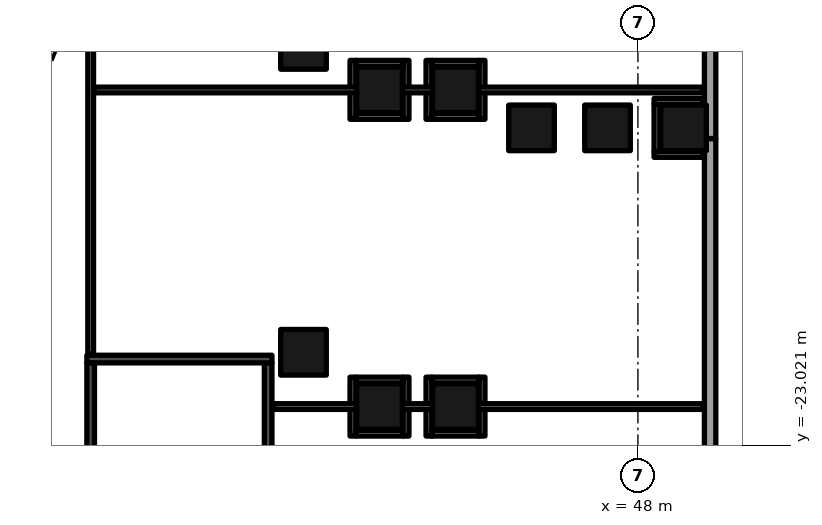
"""IFC4 building model, lengths in metres.
Left out: names, types, materials, properties, quantities, classifications, styles, units other than length and angle.
Written with IfcOpenShell. Run it as: python <this file> out.ifc"""

import sys

from ifc_helpers import new_model, si_unit, direction, frame, frame_2d, origin, origin_2d, place, context, subcontext, project, spatial, rectangle, extrude, element, fill, save


model = new_model("IFC4")
c1 = context("Model", 3, precision=1e-05, world=origin(), true_north=direction((0.0, 1.0)))
c2 = subcontext(c1, "Body", "Model", "MODEL_VIEW")
j1 = project(units=[si_unit("LENGTHUNIT", "METRE"), si_unit("PLANEANGLEUNIT", "RADIAN")], contexts=[c1])
p1 = place(None, origin())
s1 = spatial("IfcSite", under=j1, at=p1, CompositionType="ELEMENT")
p2 = place(p1, origin())
s2 = spatial("IfcBuilding", under=s1, at=p2, CompositionType="ELEMENT")
p3 = place(p2, origin())
s3 = spatial("IfcBuildingStorey", under=s2, at=p3, CompositionType="ELEMENT", Elevation=0.0)
for number, where, z_axis, x_axis in (
    (1, (39.2, -12.524, 0.0), (0.0, 0.0, 1.0), (1.0, 0.0, 0.0)),
    (2, (39.2, -20.572, 0.0), (0.0, 0.0, 1.0), (1.0, 0.0, 0.0)),
    (3, (41.2, -13.667, 0.0), (0.0, 0.0, 1.0), (1.0, 0.0, 0.0)),
    (4, (41.2, -22.001, 0.0), (0.0, 0.0, 1.0), (1.0, 0.0, 0.0)),
    (5, (43.2, -13.667, 0.0), (0.0, 0.0, 1.0), (1.0, 0.0, 0.0)),
    (6, (43.2, -22.001, 0.0), (0.0, 0.0, 1.0), (1.0, 0.0, 0.0)),
    (7, (45.2, -14.667, 0.0), (0.0, 0.0, 1.0), (1.0, 0.0, 0.0)),
    (8, (47.2, -14.667, 0.0), (0.0, 0.0, 1.0), (1.0, 0.0, 0.0)),
    (9, (49.2, -14.667, 0.0), (0.0, 0.0, 1.0), (1.0, 0.0, 0.0)),
):
    element("IfcColumn", number, at=place(p3, frame(where, z_axis=z_axis, x_axis=x_axis)), inside=s3, PredefinedType="COLUMN", context=c2, shape_type="SweptSolid", body=[
        extrude(rectangle(XDim=1.2, YDim=1.2, at=origin_2d()), origin(), (0.0, 0.0, 1.0), 9.0),
    ])
p4 = place(p3, frame((49.9, -23.498, 0.0), z_axis=(0.0, 0.0, 1.0), x_axis=(0.0, 1.0, 0.0)))
e10 = element("IfcWall", 10, at=p4, inside=s3, PredefinedType="ELEMENTEDWALL", context=c2, shape_type="SweptSolid", body=[
    extrude(rectangle(XDim=8.55, YDim=0.3, at=frame_2d((4.275, 0.0))), origin(), (0.0, 0.0, 1.0), 7.6),
])
p5 = place(p4, frame((2.002, 0.0, 0.0)))
e11 = element("IfcOpeningElement", 11, at=p5, cuts=e10, PredefinedType="OPENING", context=c2, shape_type="SweptSolid", body=[
    extrude(rectangle(XDim=3.0, YDim=2.7, at=frame_2d((1.5, 1.35))), frame((0.0, 0.16, 0.0), z_axis=(0.0, -1.0, 0.0), x_axis=(1.0, 0.0, 0.0)), (0.0, 0.0, 1.0), 0.32),
])
p6 = place(p3, frame((49.9, -14.948, 0.0), z_axis=(0.0, 0.0, 1.0), x_axis=(0.0, 1.0, 0.0)))
e12 = element("IfcWall", 12, at=p6, inside=s3, PredefinedType="ELEMENTEDWALL", context=c2, shape_type="SweptSolid", body=[
    extrude(rectangle(XDim=6.7, YDim=0.3, at=frame_2d((3.35, 0.0))), origin(), (0.0, 0.0, 1.0), 7.6),
])
p7 = place(p6, frame((3.548, 0.0, 0.0)))
e13 = element("IfcOpeningElement", 13, at=p7, cuts=e12, PredefinedType="OPENING", context=c2, shape_type="SweptSolid", body=[
    extrude(rectangle(XDim=2.0, YDim=2.4, at=frame_2d((1.0, 1.2))), frame((0.0, 0.16, 0.0), z_axis=(0.0, -1.0, 0.0), x_axis=(1.0, 0.0, 0.0)), (0.0, 0.0, 1.0), 0.32),
])
p8 = place(p3, frame((49.85, -25.093, 9.0), z_axis=(0.0, 0.0, 1.0), x_axis=(0.0, 1.0, 0.0)))
e14 = element("IfcWall", 14, at=p8, inside=s3, PredefinedType="PARAPET", context=c2, shape_type="SweptSolid", body=[
    extrude(rectangle(XDim=14.698, YDim=0.3, at=frame_2d((7.349, 0.0))), origin(), (0.0, 0.0, 1.0), 1.1),
])
p9 = place(p3, frame((33.5, -20.75, 0.0), z_axis=(0.0, 0.0, 1.0), x_axis=(1.0, 0.0, 0.0)))
e15 = element("IfcWall", 15, at=p9, inside=s3, PredefinedType="SOLIDWALL", context=c2, shape_type="SweptSolid", body=[
    extrude(rectangle(XDim=4.87, YDim=0.2, at=frame_2d((2.435, 0.0))), origin(), (0.0, 0.0, 1.0), 8.5),
])
p10 = place(p3, frame((33.6, -27.5, 0.0), z_axis=(0.0, 0.0, 1.0), x_axis=(0.0, 1.0, 0.0)))
e16 = element("IfcWall", 16, at=p10, inside=s3, PredefinedType="SOLIDWALL", context=c2, shape_type="SweptSolid", body=[
    extrude(rectangle(XDim=6.65, YDim=0.2, at=frame_2d((3.325, 0.0))), origin(), (0.0, 0.0, 1.0), 8.5),
])
p11 = place(p10, frame((0.1, 0.0, 0.0)))
e17 = element("IfcOpeningElement", 17, at=p11, cuts=e16, PredefinedType="OPENING", context=c2, shape_type="SweptSolid", body=[
    extrude(rectangle(XDim=1.8, YDim=2.4, at=frame_2d((0.9, 1.2))), frame((0.0, 0.11, 0.0), z_axis=(0.0, -1.0, 0.0), x_axis=(1.0, 0.0, 0.0)), (0.0, 0.0, 1.0), 0.22),
])
p12 = place(p3, frame((38.27, -27.5, 0.0), z_axis=(0.0, 0.0, 1.0), x_axis=(0.0, 1.0, 0.0)))
e18 = element("IfcWall", 18, at=p12, inside=s3, PredefinedType="SOLIDWALL", context=c2, shape_type="SweptSolid", body=[
    extrude(rectangle(XDim=6.65, YDim=0.2, at=frame_2d((3.325, 0.0))), origin(), (0.0, 0.0, 1.0), 8.5),
])
p13 = place(p12, frame((0.1, 0.0, 0.0)))
e19 = element("IfcOpeningElement", 19, at=p13, cuts=e18, PredefinedType="OPENING", context=c2, shape_type="SweptSolid", body=[
    extrude(rectangle(XDim=1.8, YDim=2.4, at=frame_2d((0.9, 1.2))), frame((0.0, 0.11, 0.0), z_axis=(0.0, -1.0, 0.0), x_axis=(1.0, 0.0, 0.0)), (0.0, 0.0, 1.0), 0.22),
])
p14 = place(p3, frame((40.5, -22.776, 0.0), z_axis=(0.0, 0.0, 1.0), x_axis=(0.0, 1.0, 0.0)))
e20 = element("IfcWall", 20, at=p14, inside=s3, PredefinedType="PARTITIONING", context=c2, shape_type="SweptSolid", body=[
    extrude(rectangle(XDim=1.55, YDim=0.15, at=frame_2d((0.775, 0.0))), origin(), (0.0, 0.0, 1.0), 8.5),
])
p15 = place(p3, frame((40.575, -22.701, 0.0), z_axis=(0.0, 0.0, 1.0), x_axis=(1.0, 0.0, 0.0)))
e21 = element("IfcWall", 21, at=p15, inside=s3, PredefinedType="PARTITIONING", context=c2, shape_type="SweptSolid", body=[
    extrude(rectangle(XDim=1.25, YDim=0.15, at=frame_2d((0.625, 0.0))), origin(), (0.0, 0.0, 1.0), 8.5),
])
for number, where, z_axis, x_axis in (
    (22, (41.9, -22.776, 0.0), (0.0, 0.0, 1.0), (0.0, 1.0, 0.0)),
    (23, (42.5, -22.776, 0.0), (0.0, 0.0, 1.0), (0.0, 1.0, 0.0)),
):
    element("IfcWall", number, at=place(p3, frame(where, z_axis=z_axis, x_axis=x_axis)), inside=s3, PredefinedType="PARTITIONING", context=c2, shape_type="SweptSolid", body=[
        extrude(rectangle(XDim=1.55, YDim=0.15, at=frame_2d((0.775, 0.0))), origin(), (0.0, 0.0, 1.0), 8.5),
    ])
p16 = place(p3, frame((42.575, -22.701, 0.0), z_axis=(0.0, 0.0, 1.0), x_axis=(1.0, 0.0, 0.0)))
e24 = element("IfcWall", 24, at=p16, inside=s3, PredefinedType="PARTITIONING", context=c2, shape_type="SweptSolid", body=[
    extrude(rectangle(XDim=1.25, YDim=0.15, at=frame_2d((0.625, 0.0))), origin(), (0.0, 0.0, 1.0), 8.5),
])
p17 = place(p3, frame((43.9, -22.776, 0.0), z_axis=(0.0, 0.0, 1.0), x_axis=(0.0, 1.0, 0.0)))
e25 = element("IfcWall", 25, at=p17, inside=s3, PredefinedType="PARTITIONING", context=c2, shape_type="SweptSolid", body=[
    extrude(rectangle(XDim=1.55, YDim=0.15, at=frame_2d((0.775, 0.0))), origin(), (0.0, 0.0, 1.0), 8.5),
])
p18 = place(p3, frame((38.41, -22.0, 0.0), z_axis=(0.0, 0.0, 1.0), x_axis=(1.0, 0.0, 0.0)))
e26 = element("IfcWall", 26, at=p18, inside=s3, PredefinedType="PARTITIONING", context=c2, shape_type="SweptSolid", body=[
    extrude(rectangle(XDim=2.19, YDim=0.15, at=frame_2d((1.095, 0.0))), origin(), (0.0, 0.0, 1.0), 8.5),
])
p19 = place(p3, frame((41.8, -22.0, 0.0), z_axis=(0.0, 0.0, 1.0), x_axis=(1.0, 0.0, 0.0)))
e27 = element("IfcWall", 27, at=p19, inside=s3, PredefinedType="PARTITIONING", context=c2, shape_type="SweptSolid", body=[
    extrude(rectangle(XDim=0.8, YDim=0.15, at=frame_2d((0.4, 0.0))), origin(), (0.0, 0.0, 1.0), 8.5),
])
p20 = place(p3, frame((43.8, -22.0, 0.0), z_axis=(0.0, 0.0, 1.0), x_axis=(1.0, 0.0, 0.0)))
e28 = element("IfcWall", 28, at=p20, inside=s3, PredefinedType="PARTITIONING", context=c2, shape_type="SweptSolid", body=[
    extrude(rectangle(XDim=5.92, YDim=0.15, at=frame_2d((2.96, 0.0))), origin(), (0.0, 0.0, 1.0), 7.6),
])
for number, where, z_axis, x_axis in (
    (29, (40.575, -21.301, 0.0), (0.0, 0.0, 1.0), (1.0, 0.0, 0.0)),
    (30, (42.575, -21.301, 0.0), (0.0, 0.0, 1.0), (1.0, 0.0, 0.0)),
):
    element("IfcWall", number, at=place(p3, frame(where, z_axis=z_axis, x_axis=x_axis)), inside=s3, PredefinedType="PARTITIONING", context=c2, shape_type="SweptSolid", body=[
        extrude(rectangle(XDim=1.25, YDim=0.15, at=frame_2d((0.625, 0.0))), origin(), (0.0, 0.0, 1.0), 8.5),
    ])
p21 = place(p3, frame((33.6, -20.61, 0.0), z_axis=(0.0, 0.0, 1.0), x_axis=(0.0, 1.0, 0.0)))
e31 = element("IfcWall", 31, at=p21, inside=s3, PredefinedType="PARTITIONING", context=c2, shape_type="SweptSolid", body=[
    extrude(rectangle(XDim=8.97, YDim=0.15, at=frame_2d((4.485, 0.0))), origin(), (0.0, 0.0, 1.0), 8.5),
])
p22 = place(p21, frame((2.89, 0.0, 0.0)))
e32 = element("IfcOpeningElement", 32, at=p22, cuts=e31, PredefinedType="OPENING", context=c2, shape_type="SweptSolid", body=[
    extrude(rectangle(XDim=1.2, YDim=2.1, at=frame_2d((0.6, 1.05))), frame((0.0, 0.085, 0.0), z_axis=(0.0, -1.0, 0.0), x_axis=(1.0, 0.0, 0.0)), (0.0, 0.0, 1.0), 0.17),
])
p23 = place(p3, frame((48.425, -15.367, 0.0), z_axis=(0.0, 0.0, 1.0), x_axis=(1.0, 0.0, 0.0)))
e33 = element("IfcWall", 33, at=p23, inside=s3, PredefinedType="PARTITIONING", context=c2, shape_type="SweptSolid", body=[
    extrude(rectangle(XDim=1.295, YDim=0.15, at=frame_2d((0.647, 0.0))), origin(), (0.0, 0.0, 1.0), 8.5),
])
p24 = place(p3, frame((48.5, -15.292, 0.0), z_axis=(0.0, 0.0, 1.0), x_axis=(0.0, 1.0, 0.0)))
e34 = element("IfcWall", 34, at=p24, inside=s3, PredefinedType="PARTITIONING", context=c2, shape_type="SweptSolid", body=[
    extrude(rectangle(XDim=1.25, YDim=0.15, at=frame_2d((0.625, 0.0))), origin(), (0.0, 0.0, 1.0), 8.5),
])
p25 = place(p3, frame((40.5, -14.442, 0.0), z_axis=(0.0, 0.0, 1.0), x_axis=(0.0, 1.0, 0.0)))
e35 = element("IfcWall", 35, at=p25, inside=s3, PredefinedType="PARTITIONING", context=c2, shape_type="SweptSolid", body=[
    extrude(rectangle(XDim=1.55, YDim=0.15, at=frame_2d((0.775, 0.0))), origin(), (0.0, 0.0, 1.0), 8.5),
])
p26 = place(p3, frame((40.575, -14.367, 0.0), z_axis=(0.0, 0.0, 1.0), x_axis=(1.0, 0.0, 0.0)))
e36 = element("IfcWall", 36, at=p26, inside=s3, PredefinedType="PARTITIONING", context=c2, shape_type="SweptSolid", body=[
    extrude(rectangle(XDim=1.25, YDim=0.15, at=frame_2d((0.625, 0.0))), origin(), (0.0, 0.0, 1.0), 8.5),
])
for number, where, z_axis, x_axis in (
    (37, (41.9, -14.442, 0.0), (0.0, 0.0, 1.0), (0.0, 1.0, 0.0)),
    (38, (42.5, -14.442, 0.0), (0.0, 0.0, 1.0), (0.0, 1.0, 0.0)),
):
    element("IfcWall", number, at=place(p3, frame(where, z_axis=z_axis, x_axis=x_axis)), inside=s3, PredefinedType="PARTITIONING", context=c2, shape_type="SweptSolid", body=[
        extrude(rectangle(XDim=1.55, YDim=0.15, at=frame_2d((0.775, 0.0))), origin(), (0.0, 0.0, 1.0), 8.5),
    ])
p27 = place(p3, frame((42.575, -14.367, 0.0), z_axis=(0.0, 0.0, 1.0), x_axis=(1.0, 0.0, 0.0)))
e39 = element("IfcWall", 39, at=p27, inside=s3, PredefinedType="PARTITIONING", context=c2, shape_type="SweptSolid", body=[
    extrude(rectangle(XDim=1.25, YDim=0.15, at=frame_2d((0.625, 0.0))), origin(), (0.0, 0.0, 1.0), 8.5),
])
p28 = place(p3, frame((43.9, -14.442, 0.0), z_axis=(0.0, 0.0, 1.0), x_axis=(0.0, 1.0, 0.0)))
e40 = element("IfcWall", 40, at=p28, inside=s3, PredefinedType="PARTITIONING", context=c2, shape_type="SweptSolid", body=[
    extrude(rectangle(XDim=1.55, YDim=0.15, at=frame_2d((0.775, 0.0))), origin(), (0.0, 0.0, 1.0), 8.5),
])
p29 = place(p3, frame((48.425, -13.967, 0.0), z_axis=(0.0, 0.0, 1.0), x_axis=(1.0, 0.0, 0.0)))
e41 = element("IfcWall", 41, at=p29, inside=s3, PredefinedType="PARTITIONING", context=c2, shape_type="SweptSolid", body=[
    extrude(rectangle(XDim=1.295, YDim=0.15, at=frame_2d((0.647, 0.0))), origin(), (0.0, 0.0, 1.0), 8.5),
])
p30 = place(p3, frame((33.675, -13.67, 0.0), z_axis=(0.0, 0.0, 1.0), x_axis=(1.0, 0.0, 0.0)))
e42 = element("IfcWall", 42, at=p30, inside=s3, PredefinedType="PARTITIONING", context=c2, shape_type="SweptSolid", body=[
    extrude(rectangle(XDim=6.925, YDim=0.15, at=frame_2d((3.462, 0.0))), origin(), (0.0, 0.0, 1.0), 8.5),
])
p31 = place(p3, frame((41.8, -13.67, 0.0), z_axis=(0.0, 0.0, 1.0), x_axis=(1.0, 0.0, 0.0)))
e43 = element("IfcWall", 43, at=p31, inside=s3, PredefinedType="PARTITIONING", context=c2, shape_type="SweptSolid", body=[
    extrude(rectangle(XDim=0.8, YDim=0.15, at=frame_2d((0.4, 0.0))), origin(), (0.0, 0.0, 1.0), 8.5),
])
p32 = place(p3, frame((43.8, -13.67, 0.0), z_axis=(0.0, 0.0, 1.0), x_axis=(1.0, 0.0, 0.0)))
e44 = element("IfcWall", 44, at=p32, inside=s3, PredefinedType="PARTITIONING", context=c2, shape_type="SweptSolid", body=[
    extrude(rectangle(XDim=5.92, YDim=0.15, at=frame_2d((2.96, 0.0))), origin(), (0.0, 0.0, 1.0), 7.6),
])
for number, where, z_axis, x_axis in (
    (45, (40.575, -12.967, 0.0), (0.0, 0.0, 1.0), (1.0, 0.0, 0.0)),
    (46, (42.575, -12.967, 0.0), (0.0, 0.0, 1.0), (1.0, 0.0, 0.0)),
):
    element("IfcWall", number, at=place(p3, frame(where, z_axis=z_axis, x_axis=x_axis)), inside=s3, PredefinedType="PARTITIONING", context=c2, shape_type="SweptSolid", body=[
        extrude(rectangle(XDim=1.25, YDim=0.15, at=frame_2d((0.625, 0.0))), origin(), (0.0, 0.0, 1.0), 8.5),
    ])
p33 = place(p5, origin())
e47 = element("IfcDoor", 47, at=p33, inside=s3, OperationType="DOUBLE_DOOR_SINGLE_SWING", PredefinedType="DOOR", context=c2, shape_type="SweptSolid", body=[
    extrude(rectangle(XDim=3.0, YDim=2.7, at=frame_2d((1.5, 1.35))), frame((0.0, 0.025, 0.0), z_axis=(0.0, -1.0, 0.0), x_axis=(1.0, 0.0, 0.0)), (0.0, 0.0, 1.0), 0.05),
])
fill(e11, e47)
p34 = place(p22, origin())
e48 = element("IfcDoor", 48, at=p34, inside=s3, OperationType="SINGLE_SWING_RIGHT", PredefinedType="DOOR", context=c2, shape_type="SweptSolid", body=[
    extrude(rectangle(XDim=1.2, YDim=2.1, at=frame_2d((0.6, 1.05))), frame((0.0, 0.025, 0.0), z_axis=(0.0, -1.0, 0.0), x_axis=(1.0, 0.0, 0.0)), (0.0, 0.0, 1.0), 0.05),
])
fill(e32, e48)
save(model, sys.argv[1])
